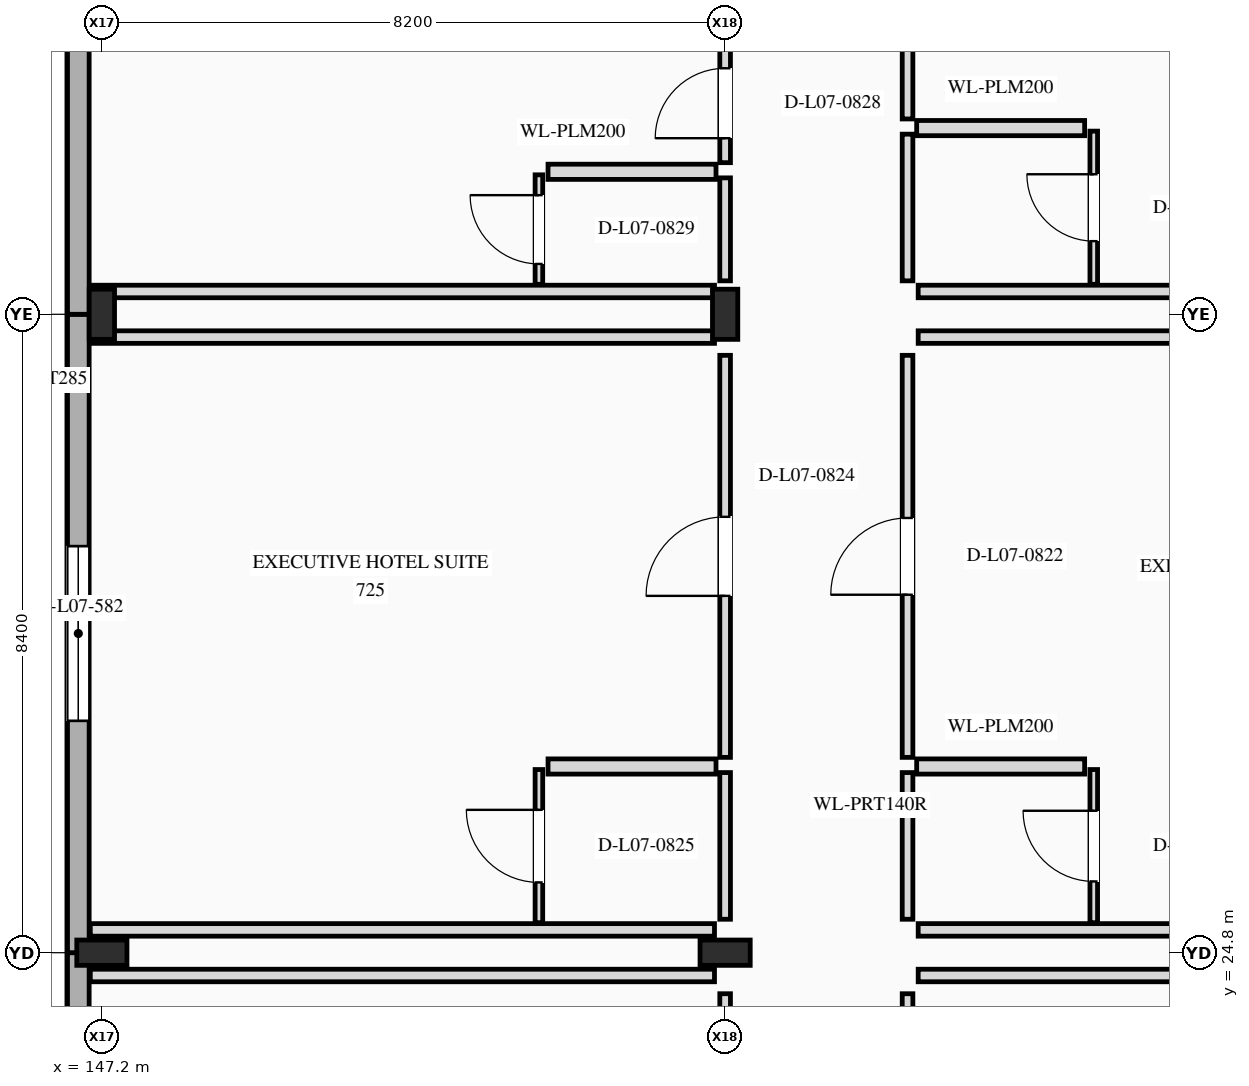
"""IFC4 building model, lengths in metres.
Left out: names, types, materials, properties, quantities, classifications, styles, units other than length and angle.
Written with IfcOpenShell. Run it as: python <this file> out.ifc"""

import sys

from ifc_helpers import new_model, si_unit, direction, frame, frame_2d, origin, origin_2d, place, context, subcontext, project, spatial, rectangle, i_section, extrude, element, fill, save


model = new_model("IFC4")
c1 = context("Model", 3, precision=1e-05, world=origin(), true_north=direction((0.0, 1.0)))
c2 = subcontext(c1, "Body", "Model", "MODEL_VIEW")
j1 = project(units=[si_unit("LENGTHUNIT", "METRE"), si_unit("PLANEANGLEUNIT", "RADIAN")], contexts=[c1])
p1 = place(None, origin())
s1 = spatial("IfcSite", under=j1, at=p1, CompositionType="ELEMENT")
p2 = place(p1, origin())
s2 = spatial("IfcBuilding", under=s1, at=p2, CompositionType="ELEMENT")
p3 = place(p2, frame((0.0, 0.0, 30.6)))
s3 = spatial("IfcBuildingStorey", under=s2, at=p3, CompositionType="ELEMENT", Elevation=30.6)
for number, where, z_axis, x_axis in (
    (1, (147.2, 24.8, 0.0), (0.0, 0.0, 1.0), (0.0, 1.0, 0.0)),
    (2, (147.2, 33.2, 0.0), (0.0, 0.0, 1.0), (1.0, 0.0, 0.0)),
    (3, (155.4, 24.8, 0.0), (0.0, 0.0, 1.0), (0.0, 1.0, 0.0)),
    (4, (155.4, 33.2, 0.0), (0.0, 0.0, 1.0), (1.0, 0.0, 0.0)),
):
    element("IfcColumn", number, at=place(p3, frame(where, z_axis=z_axis, x_axis=x_axis)), inside=s3, PredefinedType="COLUMN", context=c2, shape_type="SweptSolid", body=[
        extrude(i_section(OverallWidth=0.333, OverallDepth=0.66, WebThickness=0.024, FlangeThickness=0.044, at=origin_2d()), origin(), (0.0, 0.0, 1.0), 3.5),
    ])
p4 = place(p3, frame((146.89, 19.254, 0.0), z_axis=(0.0, 0.0, 1.0), x_axis=(0.0, 1.0, 0.0)))
e5 = element("IfcWall", 5, at=p4, inside=s3, PredefinedType="STANDARD", context=c2, shape_type="SweptSolid", body=[
    extrude(rectangle(XDim=5.546, YDim=0.285, at=frame_2d((2.773, 0.0))), origin(), (0.0, 0.0, 1.0), 3.5),
])
p5 = place(p4, frame((1.598, 0.0, 0.85)))
e6 = element("IfcOpeningElement", 6, at=p5, cuts=e5, PredefinedType="OPENING", context=c2, shape_type="SweptSolid", body=[
    extrude(rectangle(XDim=2.0, YDim=1.65, at=frame_2d((1.0, 0.825))), frame((0.0, 0.152, 0.0), z_axis=(0.0, -1.0, 0.0), x_axis=(1.0, 0.0, 0.0)), (0.0, 0.0, 1.0), 0.305),
])
p6 = place(p3, frame((146.89, 24.8, 0.0), z_axis=(0.0, 0.0, 1.0), x_axis=(0.0, 1.0, 0.0)))
e7 = element("IfcWall", 7, at=p6, inside=s3, PredefinedType="STANDARD", context=c2, shape_type="SweptSolid", body=[
    extrude(rectangle(XDim=8.4, YDim=0.285, at=frame_2d((4.2, 0.0))), origin(), (0.0, 0.0, 1.0), 3.5),
])
p7 = place(p6, frame((3.05, 0.0, 0.85)))
e8 = element("IfcOpeningElement", 8, at=p7, cuts=e7, PredefinedType="OPENING", context=c2, shape_type="SweptSolid", body=[
    extrude(rectangle(XDim=2.3, YDim=1.7, at=frame_2d((1.15, 0.85))), frame((0.0, 0.152, 0.0), z_axis=(0.0, -1.0, 0.0), x_axis=(1.0, 0.0, 0.0)), (0.0, 0.0, 1.0), 0.305),
])
p8 = place(p3, frame((146.89, 33.2, 0.0), z_axis=(0.0, 0.0, 1.0), x_axis=(0.0, 1.0, 0.0)))
e9 = element("IfcWall", 9, at=p8, inside=s3, PredefinedType="STANDARD", context=c2, shape_type="SweptSolid", body=[
    extrude(rectangle(XDim=8.4, YDim=0.285, at=frame_2d((4.2, 0.0))), origin(), (0.0, 0.0, 1.0), 3.5),
])
p9 = place(p3, frame((157.8, 25.24, 0.0), z_axis=(0.0, 0.0, 1.0), x_axis=(0.0, 1.0, 0.0)))
e10 = element("IfcWall", 10, at=p9, inside=s3, PredefinedType="PARTITIONING", context=c2, shape_type="SweptSolid", body=[
    extrude(rectangle(XDim=1.93, YDim=0.14, at=frame_2d((0.965, 0.0))), origin(), (0.0, 0.0, 1.0), 2.753),
])
p10 = place(p3, frame((157.8, 27.37, 0.0), z_axis=(0.0, 0.0, 1.0), x_axis=(0.0, 1.0, 0.0)))
e11 = element("IfcWall", 11, at=p10, inside=s3, PredefinedType="PARTITIONING", context=c2, shape_type="SweptSolid", body=[
    extrude(rectangle(XDim=5.29, YDim=0.14, at=frame_2d((2.645, 0.0))), origin(), (0.0, 0.0, 1.0), 2.753),
])
p11 = place(p10, frame((2.14, 0.0, 0.0)))
e12 = element("IfcOpeningElement", 12, at=p11, cuts=e11, PredefinedType="OPENING", context=c2, shape_type="SweptSolid", body=[
    extrude(rectangle(XDim=1.01, YDim=2.35, at=frame_2d((0.505, 1.175))), frame((0.0, 0.08, 0.0), z_axis=(0.0, -1.0, 0.0), x_axis=(1.0, 0.0, 0.0)), (0.0, 0.0, 1.0), 0.16),
])
for number, where, z_axis, x_axis in (
    (13, (157.94, 25.1, 0.0), (0.0, 0.0, 1.0), (1.0, 0.0, 0.0)),
    (14, (157.94, 32.9, 0.0), (0.0, 0.0, 1.0), (1.0, 0.0, 0.0)),
):
    element("IfcWall", number, at=place(p3, frame(where, z_axis=z_axis, x_axis=x_axis)), inside=s3, PredefinedType="PARTITIONING", context=c2, shape_type="SweptSolid", body=[
        extrude(rectangle(XDim=8.213, YDim=0.165, at=frame_2d((4.106, 0.0))), origin(), (0.0, 0.0, 1.0), 2.59),
    ])
p12 = place(p3, frame((157.92, 27.25, 0.0), z_axis=(0.0, 0.0, 1.0), x_axis=(1.0, 0.0, 0.0)))
e15 = element("IfcWall", 15, at=p12, inside=s3, PredefinedType="PLUMBINGWALL", context=c2, shape_type="SweptSolid", body=[
    extrude(rectangle(XDim=2.21, YDim=0.2, at=frame_2d((1.105, 0.0))), origin(), (0.0, 0.0, 1.0), 3.2),
])
p13 = place(p3, frame((160.25, 25.195, 0.0), z_axis=(0.0, 0.0, 1.0), x_axis=(0.0, 1.0, 0.0)))
e16 = element("IfcWall", 16, at=p13, inside=s3, PredefinedType="PARTITIONING", context=c2, shape_type="SweptSolid", body=[
    extrude(rectangle(XDim=2.015, YDim=0.1, at=frame_2d((1.008, 0.0))), origin(), (0.0, 0.0, 1.0), 2.753),
])
p14 = place(p13, frame((0.543, 0.0, 0.0)))
e17 = element("IfcOpeningElement", 17, at=p14, cuts=e16, PredefinedType="OPENING", context=c2, shape_type="SweptSolid", body=[
    extrude(rectangle(XDim=0.93, YDim=2.22, at=frame_2d((0.465, 1.11))), frame((0.0, 0.06, 0.0), z_axis=(0.0, -1.0, 0.0), x_axis=(1.0, 0.0, 0.0)), (0.0, 0.0, 1.0), 0.12),
])
p15 = place(p3, frame((155.4, 25.24, 0.0), z_axis=(0.0, 0.0, 1.0), x_axis=(0.0, 1.0, 0.0)))
e18 = element("IfcWall", 18, at=p15, inside=s3, PredefinedType="PARTITIONING", context=c2, shape_type="SweptSolid", body=[
    extrude(rectangle(XDim=1.93, YDim=0.14, at=frame_2d((0.965, 0.0))), origin(), (0.0, 0.0, 1.0), 2.674),
])
p16 = place(p3, frame((155.4, 27.37, 0.0), z_axis=(0.0, 0.0, 1.0), x_axis=(0.0, 1.0, 0.0)))
e19 = element("IfcWall", 19, at=p16, inside=s3, PredefinedType="PARTITIONING", context=c2, shape_type="SweptSolid", body=[
    extrude(rectangle(XDim=5.29, YDim=0.14, at=frame_2d((2.645, 0.0))), origin(), (0.0, 0.0, 1.0), 2.674),
])
p17 = place(p16, frame((2.125, 0.0, 0.0)))
e20 = element("IfcOpeningElement", 20, at=p17, cuts=e19, PredefinedType="OPENING", context=c2, shape_type="SweptSolid", body=[
    extrude(rectangle(XDim=1.04, YDim=2.4, at=frame_2d((0.52, 1.2))), frame((0.0, 0.08, 0.0), z_axis=(0.0, -1.0, 0.0), x_axis=(1.0, 0.0, 0.0)), (0.0, 0.0, 1.0), 0.16),
])
for number, where, z_axis, x_axis in (
    (21, (147.048, 25.1, 0.0), (0.0, 0.0, 1.0), (1.0, 0.0, 0.0)),
    (22, (147.048, 32.9, 0.0), (0.0, 0.0, 1.0), (1.0, 0.0, 0.0)),
):
    element("IfcWall", number, at=place(p3, frame(where, z_axis=z_axis, x_axis=x_axis)), inside=s3, PredefinedType="PARTITIONING", context=c2, shape_type="SweptSolid", body=[
        extrude(rectangle(XDim=8.212, YDim=0.165, at=frame_2d((4.106, 0.0))), origin(), (0.0, 0.0, 1.0), 2.613),
    ])
p18 = place(p3, frame((153.07, 27.25, 0.0), z_axis=(0.0, 0.0, 1.0), x_axis=(1.0, 0.0, 0.0)))
e23 = element("IfcWall", 23, at=p18, inside=s3, PredefinedType="PLUMBINGWALL", context=c2, shape_type="SweptSolid", body=[
    extrude(rectangle(XDim=2.21, YDim=0.2, at=frame_2d((1.105, 0.0))), origin(), (0.0, 0.0, 1.0), 3.2),
])
p19 = place(p3, frame((152.95, 25.195, 0.0), z_axis=(0.0, 0.0, 1.0), x_axis=(0.0, 1.0, 0.0)))
e24 = element("IfcWall", 24, at=p19, inside=s3, PredefinedType="PARTITIONING", context=c2, shape_type="SweptSolid", body=[
    extrude(rectangle(XDim=2.015, YDim=0.1, at=frame_2d((1.008, 0.0))), origin(), (0.0, 0.0, 1.0), 2.808),
])
p20 = place(p19, frame((0.53, 0.0, 0.0)))
e25 = element("IfcOpeningElement", 25, at=p20, cuts=e24, PredefinedType="OPENING", context=c2, shape_type="SweptSolid", body=[
    extrude(rectangle(XDim=0.955, YDim=2.22, at=frame_2d((0.478, 1.11))), frame((0.0, 0.06, 0.0), z_axis=(0.0, -1.0, 0.0), x_axis=(1.0, 0.0, 0.0)), (0.0, 0.0, 1.0), 0.12),
])
p21 = place(p3, frame((157.8, 33.64, 0.0), z_axis=(0.0, 0.0, 1.0), x_axis=(0.0, 1.0, 0.0)))
e26 = element("IfcWall", 26, at=p21, inside=s3, PredefinedType="PARTITIONING", context=c2, shape_type="SweptSolid", body=[
    extrude(rectangle(XDim=1.93, YDim=0.14, at=frame_2d((0.965, 0.0))), origin(), (0.0, 0.0, 1.0), 3.2),
])
p22 = place(p3, frame((157.8, 35.77, 0.0), z_axis=(0.0, 0.0, 1.0), x_axis=(0.0, 1.0, 0.0)))
e27 = element("IfcWall", 27, at=p22, inside=s3, PredefinedType="PARTITIONING", context=c2, shape_type="SweptSolid", body=[
    extrude(rectangle(XDim=5.29, YDim=0.14, at=frame_2d((2.645, 0.0))), origin(), (0.0, 0.0, 1.0), 3.2),
])
p23 = place(p22, frame((2.11, 0.0, 0.0)))
e28 = element("IfcOpeningElement", 28, at=p23, cuts=e27, PredefinedType="OPENING", context=c2, shape_type="SweptSolid", body=[
    extrude(rectangle(XDim=1.07, YDim=2.4, at=frame_2d((0.535, 1.2))), frame((0.0, 0.08, 0.0), z_axis=(0.0, -1.0, 0.0), x_axis=(1.0, 0.0, 0.0)), (0.0, 0.0, 1.0), 0.16),
])
p24 = place(p3, frame((157.94, 33.5, 0.0), z_axis=(0.0, 0.0, 1.0), x_axis=(1.0, 0.0, 0.0)))
e29 = element("IfcWall", 29, at=p24, inside=s3, PredefinedType="PARTITIONING", context=c2, shape_type="SweptSolid", body=[
    extrude(rectangle(XDim=8.213, YDim=0.165, at=frame_2d((4.106, 0.0))), origin(), (0.0, 0.0, 1.0), 2.59),
])
p25 = place(p3, frame((157.92, 35.65, 0.0), z_axis=(0.0, 0.0, 1.0), x_axis=(1.0, 0.0, 0.0)))
e30 = element("IfcWall", 30, at=p25, inside=s3, PredefinedType="PLUMBINGWALL", context=c2, shape_type="SweptSolid", body=[
    extrude(rectangle(XDim=2.21, YDim=0.2, at=frame_2d((1.105, 0.0))), origin(), (0.0, 0.0, 1.0), 3.2),
])
p26 = place(p3, frame((160.25, 33.594, 0.0), z_axis=(0.0, 0.0, 1.0), x_axis=(0.0, 1.0, 0.0)))
e31 = element("IfcWall", 31, at=p26, inside=s3, PredefinedType="PARTITIONING", context=c2, shape_type="SweptSolid", body=[
    extrude(rectangle(XDim=2.016, YDim=0.1, at=frame_2d((1.008, 0.0))), origin(), (0.0, 0.0, 1.0), 3.2),
])
p27 = place(p26, frame((0.568, 0.0, 0.0)))
e32 = element("IfcOpeningElement", 32, at=p27, cuts=e31, PredefinedType="OPENING", context=c2, shape_type="SweptSolid", body=[
    extrude(rectangle(XDim=0.88, YDim=2.1, at=frame_2d((0.44, 1.05))), frame((0.0, 0.06, 0.0), z_axis=(0.0, -1.0, 0.0), x_axis=(1.0, 0.0, 0.0)), (0.0, 0.0, 1.0), 0.12),
])
p28 = place(p3, frame((155.4, 33.64, 0.0), z_axis=(0.0, 0.0, 1.0), x_axis=(0.0, 1.0, 0.0)))
e33 = element("IfcWall", 33, at=p28, inside=s3, PredefinedType="PARTITIONING", context=c2, shape_type="SweptSolid", body=[
    extrude(rectangle(XDim=1.355, YDim=0.14, at=frame_2d((0.678, 0.0))), origin(), (0.0, 0.0, 1.0), 2.59),
])
p29 = place(p3, frame((155.4, 35.195, 0.0), z_axis=(0.0, 0.0, 1.0), x_axis=(0.0, 1.0, 0.0)))
e34 = element("IfcWall", 34, at=p29, inside=s3, PredefinedType="PARTITIONING", context=c2, shape_type="SweptSolid", body=[
    extrude(rectangle(XDim=1.565, YDim=0.14, at=frame_2d((0.782, 0.0))), origin(), (0.0, 0.0, 1.0), 2.59),
])
p30 = place(p29, frame((0.322, 0.0, 0.0)))
e35 = element("IfcOpeningElement", 35, at=p30, cuts=e34, PredefinedType="OPENING", context=c2, shape_type="SweptSolid", body=[
    extrude(rectangle(XDim=0.92, YDim=2.15, at=frame_2d((0.46, 1.075))), frame((0.0, 0.08, 0.0), z_axis=(0.0, -1.0, 0.0), x_axis=(1.0, 0.0, 0.0)), (0.0, 0.0, 1.0), 0.16),
])
p31 = place(p3, frame((147.048, 33.5, 0.0), z_axis=(0.0, 0.0, 1.0), x_axis=(1.0, 0.0, 0.0)))
e36 = element("IfcWall", 36, at=p31, inside=s3, PredefinedType="PARTITIONING", context=c2, shape_type="SweptSolid", body=[
    extrude(rectangle(XDim=8.212, YDim=0.165, at=frame_2d((4.106, 0.0))), origin(), (0.0, 0.0, 1.0), 2.613),
])
p32 = place(p3, frame((153.07, 35.075, 0.0), z_axis=(0.0, 0.0, 1.0), x_axis=(1.0, 0.0, 0.0)))
e37 = element("IfcWall", 37, at=p32, inside=s3, PredefinedType="PLUMBINGWALL", context=c2, shape_type="SweptSolid", body=[
    extrude(rectangle(XDim=2.21, YDim=0.2, at=frame_2d((1.105, 0.0))), origin(), (0.0, 0.0, 1.0), 3.2),
])
p33 = place(p3, frame((152.95, 33.594, 0.0), z_axis=(0.0, 0.0, 1.0), x_axis=(0.0, 1.0, 0.0)))
e38 = element("IfcWall", 38, at=p33, inside=s3, PredefinedType="PARTITIONING", context=c2, shape_type="SweptSolid", body=[
    extrude(rectangle(XDim=1.44, YDim=0.1, at=frame_2d((0.72, 0.0))), origin(), (0.0, 0.0, 1.0), 3.2),
])
p34 = place(p33, frame((0.268, 0.0, 0.0)))
e39 = element("IfcOpeningElement", 39, at=p34, cuts=e38, PredefinedType="OPENING", context=c2, shape_type="SweptSolid", body=[
    extrude(rectangle(XDim=0.905, YDim=2.1, at=frame_2d((0.453, 1.05))), frame((0.0, 0.06, 0.0), z_axis=(0.0, -1.0, 0.0), x_axis=(1.0, 0.0, 0.0)), (0.0, 0.0, 1.0), 0.12),
])
p35 = place(p3, frame((157.8, 19.34, 0.0), z_axis=(0.0, 0.0, 1.0), x_axis=(0.0, 1.0, 0.0)))
e40 = element("IfcWall", 40, at=p35, inside=s3, PredefinedType="PARTITIONING", context=c2, shape_type="SweptSolid", body=[
    extrude(rectangle(XDim=4.92, YDim=0.14, at=frame_2d((2.46, 0.0))), origin(), (0.0, 0.0, 1.0), 2.758),
])
p36 = place(p35, frame((1.985, 0.0, 0.0)))
e41 = element("IfcOpeningElement", 41, at=p36, cuts=e40, PredefinedType="OPENING", context=c2, shape_type="SweptSolid", body=[
    extrude(rectangle(XDim=0.95, YDim=2.3, at=frame_2d((0.475, 1.15))), frame((0.0, 0.08, 0.0), z_axis=(0.0, -1.0, 0.0), x_axis=(1.0, 0.0, 0.0)), (0.0, 0.0, 1.0), 0.16),
])
p37 = place(p3, frame((157.94, 24.5, 0.0), z_axis=(0.0, 0.0, 1.0), x_axis=(1.0, 0.0, 0.0)))
e42 = element("IfcWall", 42, at=p37, inside=s3, PredefinedType="PARTITIONING", context=c2, shape_type="SweptSolid", body=[
    extrude(rectangle(XDim=8.213, YDim=0.165, at=frame_2d((4.106, 0.0))), origin(), (0.0, 0.0, 1.0), 2.59),
])
p38 = place(p3, frame((155.4, 19.34, 0.0), z_axis=(0.0, 0.0, 1.0), x_axis=(0.0, 1.0, 0.0)))
e43 = element("IfcWall", 43, at=p38, inside=s3, PredefinedType="PARTITIONING", context=c2, shape_type="SweptSolid", body=[
    extrude(rectangle(XDim=4.92, YDim=0.14, at=frame_2d((2.46, 0.0))), origin(), (0.0, 0.0, 1.0), 2.674),
])
p39 = place(p38, frame((1.97, 0.0, 0.0)))
e44 = element("IfcOpeningElement", 44, at=p39, cuts=e43, PredefinedType="OPENING", context=c2, shape_type="SweptSolid", body=[
    extrude(rectangle(XDim=0.98, YDim=2.35, at=frame_2d((0.49, 1.175))), frame((0.0, 0.08, 0.0), z_axis=(0.0, -1.0, 0.0), x_axis=(1.0, 0.0, 0.0)), (0.0, 0.0, 1.0), 0.16),
])
p40 = place(p3, frame((147.048, 24.5, 0.0), z_axis=(0.0, 0.0, 1.0), x_axis=(1.0, 0.0, 0.0)))
e45 = element("IfcWall", 45, at=p40, inside=s3, PredefinedType="PARTITIONING", context=c2, shape_type="SweptSolid", body=[
    extrude(rectangle(XDim=8.212, YDim=0.165, at=frame_2d((4.106, 0.0))), origin(), (0.0, 0.0, 1.0), 2.613),
])
p41 = place(p7, origin())
e46 = element("IfcWindow", 46, at=p41, inside=s3, PartitioningType="SINGLE_PANEL", PredefinedType="WINDOW", context=c2, shape_type="SweptSolid", body=[
    extrude(rectangle(XDim=2.3, YDim=1.7, at=frame_2d((1.15, 0.85))), frame((0.0, 0.03, 0.0), z_axis=(0.0, -1.0, 0.0), x_axis=(1.0, 0.0, 0.0)), (0.0, 0.0, 1.0), 0.06),
])
fill(e8, e46)
p42 = place(p11, origin())
e47 = element("IfcDoor", 47, at=p42, inside=s3, OperationType="SINGLE_SWING_LEFT", PredefinedType="DOOR", context=c2, shape_type="SweptSolid", body=[
    extrude(rectangle(XDim=1.01, YDim=2.35, at=frame_2d((0.505, 1.175))), frame((0.0, 0.025, 0.0), z_axis=(0.0, -1.0, 0.0), x_axis=(1.0, 0.0, 0.0)), (0.0, 0.0, 1.0), 0.05),
])
fill(e12, e47)
p43 = place(p14, origin())
e48 = element("IfcDoor", 48, at=p43, inside=s3, OperationType="SINGLE_SWING_RIGHT", PredefinedType="DOOR", context=c2, shape_type="SweptSolid", body=[
    extrude(rectangle(XDim=0.93, YDim=2.22, at=frame_2d((0.465, 1.11))), frame((0.0, 0.025, 0.0), z_axis=(0.0, -1.0, 0.0), x_axis=(1.0, 0.0, 0.0)), (0.0, 0.0, 1.0), 0.05),
])
fill(e17, e48)
p44 = place(p17, origin())
e49 = element("IfcDoor", 49, at=p44, inside=s3, OperationType="SINGLE_SWING_LEFT", PredefinedType="DOOR", context=c2, shape_type="SweptSolid", body=[
    extrude(rectangle(XDim=1.04, YDim=2.4, at=frame_2d((0.52, 1.2))), frame((0.0, 0.025, 0.0), z_axis=(0.0, -1.0, 0.0), x_axis=(1.0, 0.0, 0.0)), (0.0, 0.0, 1.0), 0.05),
])
fill(e20, e49)
p45 = place(p20, origin())
e50 = element("IfcDoor", 50, at=p45, inside=s3, OperationType="SINGLE_SWING_RIGHT", PredefinedType="DOOR", context=c2, shape_type="SweptSolid", body=[
    extrude(rectangle(XDim=0.955, YDim=2.22, at=frame_2d((0.478, 1.11))), frame((0.0, 0.025, 0.0), z_axis=(0.0, -1.0, 0.0), x_axis=(1.0, 0.0, 0.0)), (0.0, 0.0, 1.0), 0.05),
])
fill(e25, e50)
p46 = place(p27, origin())
e51 = element("IfcDoor", 51, at=p46, inside=s3, OperationType="SINGLE_SWING_RIGHT", PredefinedType="DOOR", context=c2, shape_type="SweptSolid", body=[
    extrude(rectangle(XDim=0.88, YDim=2.1, at=frame_2d((0.44, 1.05))), frame((0.0, 0.025, 0.0), z_axis=(0.0, -1.0, 0.0), x_axis=(1.0, 0.0, 0.0)), (0.0, 0.0, 1.0), 0.05),
])
fill(e32, e51)
p47 = place(p30, origin())
e52 = element("IfcDoor", 52, at=p47, inside=s3, OperationType="SINGLE_SWING_LEFT", PredefinedType="DOOR", context=c2, shape_type="SweptSolid", body=[
    extrude(rectangle(XDim=0.92, YDim=2.15, at=frame_2d((0.46, 1.075))), frame((0.0, 0.025, 0.0), z_axis=(0.0, -1.0, 0.0), x_axis=(1.0, 0.0, 0.0)), (0.0, 0.0, 1.0), 0.05),
])
fill(e35, e52)
p48 = place(p34, origin())
e53 = element("IfcDoor", 53, at=p48, inside=s3, OperationType="SINGLE_SWING_RIGHT", PredefinedType="DOOR", context=c2, shape_type="SweptSolid", body=[
    extrude(rectangle(XDim=0.905, YDim=2.1, at=frame_2d((0.453, 1.05))), frame((0.0, 0.025, 0.0), z_axis=(0.0, -1.0, 0.0), x_axis=(1.0, 0.0, 0.0)), (0.0, 0.0, 1.0), 0.05),
])
fill(e39, e53)
save(model, sys.argv[1])
